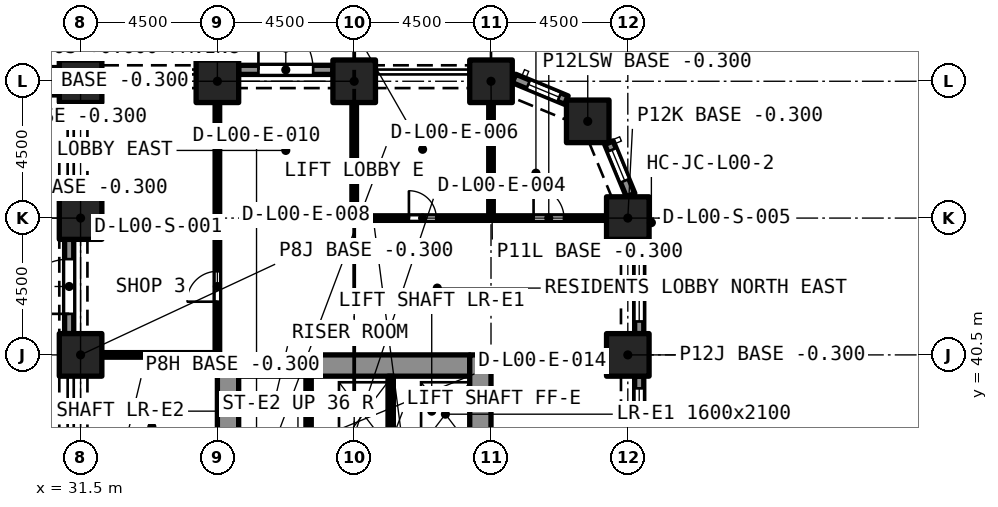
"""IFC4 building model, lengths in metres.
Left out: names, types, materials, properties, quantities, classifications, styles, units other than length and angle.
Written with IfcOpenShell. Run it as: python <this file> out.ifc"""

import sys

from ifc_helpers import new_model, si_unit, direction, frame, frame_2d, origin, origin_2d, place, context, subcontext, project, spatial, rectangle, extrude, element, fill, save


model = new_model("IFC4")
c1 = context("Model", 3, precision=1e-05, world=origin(), true_north=direction((0.0, 1.0)))
c2 = subcontext(c1, "Body", "Model", "MODEL_VIEW")
j1 = project(units=[si_unit("LENGTHUNIT", "METRE"), si_unit("PLANEANGLEUNIT", "RADIAN")], contexts=[c1])
p1 = place(None, origin())
s1 = spatial("IfcSite", under=j1, at=p1, CompositionType="ELEMENT")
p2 = place(p1, origin())
s2 = spatial("IfcBuilding", under=s1, at=p2, CompositionType="ELEMENT")
p3 = place(p2, origin())
s3 = spatial("IfcBuildingStorey", under=s2, at=p3, CompositionType="ELEMENT", Elevation=0.0)
for number, where, z_axis, x_axis in (
    (1, (31.5, 40.5, -0.3), (0.0, 0.0, 1.0), (1.0, 0.0, 0.0)),
    (2, (49.5, 40.5, -0.3), (0.0, 0.0, 1.0), (1.0, 0.0, 0.0)),
    (3, (31.5, 45.0, -0.3), (0.0, 0.0, 1.0), (1.0, 0.0, 0.0)),
    (4, (49.5, 45.0, -0.3), (0.0, 0.0, 1.0), (1.0, 0.0, 0.0)),
    (5, (48.182, 48.182, -0.3), (0.0, 0.0, 1.0), (1.0, 0.0, 0.0)),
    (6, (31.5, 49.5, -0.3), (0.0, 0.0, 1.0), (1.0, 0.0, 0.0)),
    (7, (36.0, 49.5, -0.3), (0.0, 0.0, 1.0), (1.0, 0.0, 0.0)),
    (8, (40.5, 49.5, -0.3), (0.0, 0.0, 1.0), (1.0, 0.0, 0.0)),
    (9, (45.0, 49.5, -0.3), (0.0, 0.0, 1.0), (1.0, 0.0, 0.0)),
):
    element("IfcColumn", number, at=place(p3, frame(where, z_axis=z_axis, x_axis=x_axis)), inside=s3, PredefinedType="COLUMN", context=c2, shape_type="SweptSolid", body=[
        extrude(rectangle(XDim=1.4, YDim=1.4, at=origin_2d()), origin(), (0.0, 0.0, 1.0), 6.3),
    ])
p4 = place(p3, frame((36.7, 40.15, -0.3), z_axis=(0.0, 0.0, 1.0), x_axis=(1.0, 0.0, 0.0)))
e10 = element("IfcWall", 10, at=p4, inside=s3, PredefinedType="SOLIDWALL", context=c2, shape_type="SweptSolid", body=[
    extrude(rectangle(XDim=7.6, YDim=0.7, at=frame_2d((3.8, 0.0))), origin(), (0.0, 0.0, 1.0), 6.3),
])
p5 = place(p3, frame((36.35, 27.0, -0.3), z_axis=(0.0, 0.0, 1.0), x_axis=(0.0, 1.0, 0.0)))
e11 = element("IfcWall", 11, at=p5, inside=s3, PredefinedType="SOLIDWALL", context=c2, shape_type="SweptSolid", body=[
    extrude(rectangle(XDim=13.5, YDim=0.7, at=frame_2d((6.75, 0.0))), origin(), (0.0, 0.0, 1.0), 6.3),
])
p6 = place(p5, frame((8.95, 0.0, 0.3)))
e12 = element("IfcOpeningElement", 12, at=p6, cuts=e11, PredefinedType="OPENING", context=c2, shape_type="SweptSolid", body=[
    extrude(rectangle(XDim=1.2, YDim=2.1, at=frame_2d((0.6, 1.05))), frame((0.0, 0.36, 0.0), z_axis=(0.0, -1.0, 0.0), x_axis=(1.0, 0.0, 0.0)), (0.0, 0.0, 1.0), 0.72),
])
p7 = place(p3, frame((44.65, 27.0, -0.3), z_axis=(0.0, 0.0, 1.0), x_axis=(0.0, 1.0, 0.0)))
e13 = element("IfcWall", 13, at=p7, inside=s3, PredefinedType="SOLIDWALL", context=c2, shape_type="SweptSolid", body=[
    extrude(rectangle(XDim=13.5, YDim=0.7, at=frame_2d((6.75, 0.0))), origin(), (0.0, 0.0, 1.0), 6.3),
])
p8 = place(p7, frame((8.95, 0.0, 0.3)))
e14 = element("IfcOpeningElement", 14, at=p8, cuts=e13, PredefinedType="OPENING", context=c2, shape_type="SweptSolid", body=[
    extrude(rectangle(XDim=1.2, YDim=2.1, at=frame_2d((0.6, 1.05))), frame((0.0, 0.36, 0.0), z_axis=(0.0, -1.0, 0.0), x_axis=(1.0, 0.0, 0.0)), (0.0, 0.0, 1.0), 0.72),
])
p9 = place(p3, frame((53.45, 44.4, -0.3), z_axis=(0.0, 0.0, 1.0), x_axis=(1.0, 0.0, 0.0)))
e15 = element("IfcColumn", 15, at=p9, inside=s3, PredefinedType="COLUMN", context=c2, shape_type="SweptSolid", body=[
    extrude(rectangle(XDim=0.6, YDim=0.6, at=origin_2d()), origin(), (0.0, 0.0, 1.0), 6.0),
])
p10 = place(p3, frame((49.875, 39.8, 0.0), z_axis=(0.0, 0.0, 1.0), x_axis=(0.0, -1.0, 0.0)))
e16 = element("IfcWall", 16, at=p10, inside=s3, PredefinedType="SOLIDWALL", context=c2, shape_type="SweptSolid", body=[
    extrude(rectangle(XDim=3.1, YDim=0.3, at=frame_2d((1.55, 0.0))), origin(), (0.0, 0.0, 1.0), 6.0),
])
p11 = place(p10, frame((0.4, 0.0, 0.45)))
e17 = element("IfcOpeningElement", 17, at=p11, cuts=e16, PredefinedType="OPENING", context=c2, shape_type="SweptSolid", body=[
    extrude(rectangle(XDim=2.3, YDim=3.3, at=frame_2d((1.15, 1.65))), frame((0.0, 0.16, 0.0), z_axis=(0.0, -1.0, 0.0), x_axis=(1.0, 0.0, 0.0)), (0.0, 0.0, 1.0), 0.32),
])
p12 = place(p3, frame((49.875, 44.3, 0.0), z_axis=(0.0, 0.0, 1.0), x_axis=(0.0, -1.0, 0.0)))
e18 = element("IfcWall", 18, at=p12, inside=s3, PredefinedType="SOLIDWALL", context=c2, shape_type="SweptSolid", body=[
    extrude(rectangle(XDim=3.1, YDim=0.3, at=frame_2d((1.55, 0.0))), origin(), (0.0, 0.0, 1.0), 6.0),
])
p13 = place(p12, frame((0.4, 0.0, 0.45)))
e19 = element("IfcOpeningElement", 19, at=p13, cuts=e18, PredefinedType="OPENING", context=c2, shape_type="SweptSolid", body=[
    extrude(rectangle(XDim=2.3, YDim=3.3, at=frame_2d((1.15, 1.65))), frame((0.0, 0.16, 0.0), z_axis=(0.0, -1.0, 0.0), x_axis=(1.0, 0.0, 0.0)), (0.0, 0.0, 1.0), 0.32),
])
p14 = place(p3, frame((48.878, 47.48, 0.0), z_axis=(0.0, 0.0, 1.0), x_axis=(0.38262540684, -0.923903565336, 0.0)))
e20 = element("IfcWall", 20, at=p14, inside=s3, PredefinedType="SOLIDWALL", context=c2, shape_type="SweptSolid", body=[
    extrude(rectangle(XDim=1.865, YDim=0.3, at=frame_2d((0.933, 0.0))), origin(), (0.0, 0.0, 1.0), 6.0),
])
p15 = place(p14, frame((0.258, 0.0, 0.45)))
e21 = element("IfcOpeningElement", 21, at=p15, cuts=e20, PredefinedType="OPENING", context=c2, shape_type="SweptSolid", body=[
    extrude(rectangle(XDim=1.1, YDim=3.3, at=frame_2d((0.55, 1.65))), frame((0.0, 0.16, 0.0), z_axis=(0.0, -1.0, 0.0), x_axis=(1.0, 0.0, 0.0)), (0.0, 0.0, 1.0), 0.32),
])
p16 = place(p3, frame((45.757, 49.592, 0.0), z_axis=(0.0, 0.0, 1.0), x_axis=(0.923857286003, -0.382737135771, 0.0)))
e22 = element("IfcWall", 22, at=p16, inside=s3, PredefinedType="SOLIDWALL", context=c2, shape_type="SweptSolid", body=[
    extrude(rectangle(XDim=1.865, YDim=0.3, at=frame_2d((0.933, 0.0))), origin(), (0.0, 0.0, 1.0), 6.0),
])
p17 = place(p16, frame((0.508, 0.0, 0.45)))
e23 = element("IfcOpeningElement", 23, at=p17, cuts=e22, PredefinedType="OPENING", context=c2, shape_type="SweptSolid", body=[
    extrude(rectangle(XDim=1.1, YDim=3.3, at=frame_2d((0.55, 1.65))), frame((0.0, 0.16, 0.0), z_axis=(0.0, -1.0, 0.0), x_axis=(1.0, 0.0, 0.0)), (0.0, 0.0, 1.0), 0.32),
])
p18 = place(p3, frame((36.7, 49.875, 0.0), z_axis=(0.0, 0.0, 1.0), x_axis=(1.0, 0.0, 0.0)))
e24 = element("IfcWall", 24, at=p18, inside=s3, PredefinedType="SOLIDWALL", context=c2, shape_type="SweptSolid", body=[
    extrude(rectangle(XDim=3.1, YDim=0.3, at=frame_2d((1.55, 0.0))), origin(), (0.0, 0.0, 1.0), 6.0),
])
p19 = place(p18, frame((0.65, 0.0, 0.0)))
e25 = element("IfcOpeningElement", 25, at=p19, cuts=e24, PredefinedType="OPENING", context=c2, shape_type="SweptSolid", body=[
    extrude(rectangle(XDim=1.8, YDim=2.4, at=frame_2d((0.9, 1.2))), frame((0.0, 0.16, 0.0), z_axis=(0.0, -1.0, 0.0), x_axis=(1.0, 0.0, 0.0)), (0.0, 0.0, 1.0), 0.32),
])
p20 = place(p3, frame((31.125, 41.2, 0.0), z_axis=(0.0, 0.0, 1.0), x_axis=(0.0, 1.0, 0.0)))
e26 = element("IfcWall", 26, at=p20, inside=s3, PredefinedType="SOLIDWALL", context=c2, shape_type="SweptSolid", body=[
    extrude(rectangle(XDim=3.1, YDim=0.3, at=frame_2d((1.55, 0.0))), origin(), (0.0, 0.0, 1.0), 6.0),
])
p21 = place(p20, frame((0.65, 0.0, 0.0)))
e27 = element("IfcOpeningElement", 27, at=p21, cuts=e26, PredefinedType="OPENING", context=c2, shape_type="SweptSolid", body=[
    extrude(rectangle(XDim=1.8, YDim=2.4, at=frame_2d((0.9, 1.2))), frame((0.0, 0.16, 0.0), z_axis=(0.0, -1.0, 0.0), x_axis=(1.0, 0.0, 0.0)), (0.0, 0.0, 1.0), 0.32),
])
p22 = place(p3, frame((28.55, 49.5, 0.0), z_axis=(0.0, 0.0, 1.0), x_axis=(1.0, 0.0, 0.0)))
e28 = element("IfcWall", 28, at=p22, inside=s3, PredefinedType="SOLIDWALL", context=c2, shape_type="SweptSolid", body=[
    extrude(rectangle(XDim=2.25, YDim=0.9, at=frame_2d((1.125, 0.0))), origin(), (0.0, 0.0, 1.0), 10.5),
])
p23 = place(p3, frame((50.35, 44.85, 0.0), z_axis=(0.0, 0.0, 1.0), x_axis=(1.0, 0.0, 0.0)))
e29 = element("IfcWall", 29, at=p23, inside=s3, PredefinedType="SOLIDWALL", context=c2, shape_type="SweptSolid", body=[
    extrude(rectangle(XDim=21.4, YDim=0.3, at=frame_2d((10.7, 0.0))), origin(), (0.0, 0.0, 1.0), 5.7),
])
p24 = place(p23, frame((15.6, 0.0, 0.0)))
e30 = element("IfcOpeningElement", 30, at=p24, cuts=e29, PredefinedType="OPENING", context=c2, shape_type="SweptSolid", body=[
    extrude(rectangle(XDim=2.0, YDim=2.4, at=frame_2d((1.0, 1.2))), frame((0.0, 0.16, 0.0), z_axis=(0.0, -1.0, 0.0), x_axis=(1.0, 0.0, 0.0)), (0.0, 0.0, 1.0), 0.32),
])
p25 = place(p3, frame((50.5, 9.3, 0.0), z_axis=(0.0, 0.0, 1.0), x_axis=(0.0, 1.0, 0.0)))
e31 = element("IfcWall", 31, at=p25, inside=s3, PredefinedType="SOLIDWALL", context=c2, shape_type="SweptSolid", body=[
    extrude(rectangle(XDim=35.4, YDim=0.3, at=frame_2d((17.7, 0.0))), origin(), (0.0, 0.0, 1.0), 5.7),
])
for number, where, z_axis, x_axis in (
    (32, (41.7, 37.5, 0.0), (0.0, 0.0, 1.0), (0.0, 1.0, 0.0)),
    (33, (39.0, 37.5, 0.0), (0.0, 0.0, 1.0), (0.0, 1.0, 0.0)),
):
    element("IfcWall", number, at=place(p3, frame(where, z_axis=z_axis, x_axis=x_axis)), inside=s3, PredefinedType="SOLIDWALL", context=c2, shape_type="SweptSolid", body=[
        extrude(rectangle(XDim=2.3, YDim=0.175, at=frame_2d((1.15, 0.0))), origin(), (0.0, 0.0, 1.0), 5.65),
    ])
p26 = place(p3, frame((32.2, 40.5, 0.0), z_axis=(0.0, 0.0, 1.0), x_axis=(1.0, 0.0, 0.0)))
e34 = element("IfcWall", 34, at=p26, inside=s3, PredefinedType="PARTITIONING", context=c2, shape_type="SweptSolid", body=[
    extrude(rectangle(XDim=3.725, YDim=0.15, at=frame_2d((1.863, 0.0))), origin(), (0.0, 0.0, 1.0), 5.65),
])
p27 = place(p3, frame((36.0, 45.0, 0.0), z_axis=(0.0, 0.0, 1.0), x_axis=(0.0, 1.0, 0.0)))
e35 = element("IfcWall", 35, at=p27, inside=s3, PredefinedType="PARTITIONING", context=c2, shape_type="SweptSolid", body=[
    extrude(rectangle(XDim=3.8, YDim=0.15, at=frame_2d((1.9, 0.0))), origin(), (0.0, 0.0, 1.0), 5.65),
])
p28 = place(p3, frame((36.0, 40.425, 0.0), z_axis=(0.0, 0.0, 1.0), x_axis=(0.0, 1.0, 0.0)))
e36 = element("IfcWall", 36, at=p28, inside=s3, PredefinedType="PARTITIONING", context=c2, shape_type="SweptSolid", body=[
    extrude(rectangle(XDim=4.575, YDim=0.15, at=frame_2d((2.288, 0.0))), origin(), (0.0, 0.0, 1.0), 5.65),
])
p29 = place(p28, frame((1.825, 0.0, 0.0)))
e37 = element("IfcOpeningElement", 37, at=p29, cuts=e36, PredefinedType="OPENING", context=c2, shape_type="SweptSolid", body=[
    extrude(rectangle(XDim=1.0, YDim=2.1, at=frame_2d((0.5, 1.05))), frame((0.0, 0.085, 0.0), z_axis=(0.0, -1.0, 0.0), x_axis=(1.0, 0.0, 0.0)), (0.0, 0.0, 1.0), 0.17),
])
p30 = place(p3, frame((45.0, 45.075, 0.0), z_axis=(0.0, 0.0, 1.0), x_axis=(0.0, 1.0, 0.0)))
e38 = element("IfcWall", 38, at=p30, inside=s3, PredefinedType="PARTITIONING", context=c2, shape_type="SweptSolid", body=[
    extrude(rectangle(XDim=3.725, YDim=0.15, at=frame_2d((1.863, 0.0))), origin(), (0.0, 0.0, 1.0), 5.65),
])
p31 = place(p3, frame((45.0, 45.0, 0.0), z_axis=(0.0, 0.0, 1.0), x_axis=(1.0, 0.0, 0.0)))
e39 = element("IfcWall", 39, at=p31, inside=s3, PredefinedType="PARTITIONING", context=c2, shape_type="SweptSolid", body=[
    extrude(rectangle(XDim=3.8, YDim=0.15, at=frame_2d((1.9, 0.0))), origin(), (0.0, 0.0, 1.0), 5.65),
])
p32 = place(p31, frame((1.4, 0.0, 0.0)))
e40 = element("IfcOpeningElement", 40, at=p32, cuts=e39, PredefinedType="OPENING", context=c2, shape_type="SweptSolid", body=[
    extrude(rectangle(XDim=1.0, YDim=2.1, at=frame_2d((0.5, 1.05))), frame((0.0, 0.085, 0.0), z_axis=(0.0, -1.0, 0.0), x_axis=(1.0, 0.0, 0.0)), (0.0, 0.0, 1.0), 0.17),
])
p33 = place(p3, frame((40.5, 45.075, 0.0), z_axis=(0.0, 0.0, 1.0), x_axis=(0.0, 1.0, 0.0)))
e41 = element("IfcWall", 41, at=p33, inside=s3, PredefinedType="PARTITIONING", context=c2, shape_type="SweptSolid", body=[
    extrude(rectangle(XDim=3.725, YDim=0.15, at=frame_2d((1.863, 0.0))), origin(), (0.0, 0.0, 1.0), 5.65),
])
p34 = place(p3, frame((40.425, 45.0, 0.0), z_axis=(0.0, 0.0, 1.0), x_axis=(1.0, 0.0, 0.0)))
e42 = element("IfcWall", 42, at=p34, inside=s3, PredefinedType="PARTITIONING", context=c2, shape_type="SweptSolid", body=[
    extrude(rectangle(XDim=4.575, YDim=0.15, at=frame_2d((2.288, 0.0))), origin(), (0.0, 0.0, 1.0), 5.65),
])
p35 = place(p34, frame((1.875, 0.0, 0.0)))
e43 = element("IfcOpeningElement", 43, at=p35, cuts=e42, PredefinedType="OPENING", context=c2, shape_type="SweptSolid", body=[
    extrude(rectangle(XDim=0.9, YDim=2.1, at=frame_2d((0.45, 1.05))), frame((0.0, 0.085, 0.0), z_axis=(0.0, -1.0, 0.0), x_axis=(1.0, 0.0, 0.0)), (0.0, 0.0, 1.0), 0.17),
])
p36 = place(p3, frame((50.65, 39.0, 0.0), z_axis=(0.0, 0.0, 1.0), x_axis=(1.0, 0.0, 0.0)))
e44 = element("IfcWall", 44, at=p36, inside=s3, PredefinedType="PARTITIONING", context=c2, shape_type="SweptSolid", body=[
    extrude(rectangle(XDim=0.75, YDim=0.2, at=frame_2d((0.375, 0.0))), origin(), (0.0, 0.0, 1.0), 4.9),
])
p37 = place(p3, frame((51.4, 39.0, 0.0), z_axis=(0.0, 0.0, 1.0), x_axis=(1.0, 0.0, 0.0)))
e45 = element("IfcWall", 45, at=p37, inside=s3, PredefinedType="PARTITIONING", context=c2, shape_type="SweptSolid", body=[
    extrude(rectangle(XDim=1.7, YDim=0.2, at=frame_2d((0.85, 0.0))), origin(), (0.0, 0.0, 1.0), 4.9),
])
p38 = place(p37, frame((0.35, 0.0, 0.0)))
e46 = element("IfcOpeningElement", 46, at=p38, cuts=e45, PredefinedType="OPENING", context=c2, shape_type="SweptSolid", body=[
    extrude(rectangle(XDim=1.0, YDim=2.1, at=frame_2d((0.5, 1.05))), frame((0.0, 0.11, 0.0), z_axis=(0.0, -1.0, 0.0), x_axis=(1.0, 0.0, 0.0)), (0.0, 0.0, 1.0), 0.22),
])
p39 = place(p3, frame((53.1, 39.0, 0.0), z_axis=(0.0, 0.0, 1.0), x_axis=(1.0, 0.0, 0.0)))
e47 = element("IfcWall", 47, at=p39, inside=s3, PredefinedType="PARTITIONING", context=c2, shape_type="SweptSolid", body=[
    extrude(rectangle(XDim=0.75, YDim=0.2, at=frame_2d((0.375, 0.0))), origin(), (0.0, 0.0, 1.0), 4.9),
])
p40 = place(p3, frame((53.85, 39.0, 0.0), z_axis=(0.0, 0.0, 1.0), x_axis=(1.0, 0.0, 0.0)))
e48 = element("IfcWall", 48, at=p40, inside=s3, PredefinedType="PARTITIONING", context=c2, shape_type="SweptSolid", body=[
    extrude(rectangle(XDim=1.3, YDim=0.2, at=frame_2d((0.65, 0.0))), origin(), (0.0, 0.0, 1.0), 5.7),
])
p41 = place(p3, frame((55.15, 39.0, 0.0), z_axis=(0.0, 0.0, 1.0), x_axis=(1.0, 0.0, 0.0)))
e49 = element("IfcWall", 49, at=p41, inside=s3, PredefinedType="PARTITIONING", context=c2, shape_type="SweptSolid", body=[
    extrude(rectangle(XDim=1.7, YDim=0.2, at=frame_2d((0.85, 0.0))), origin(), (0.0, 0.0, 1.0), 5.7),
])
p42 = place(p41, frame((0.35, 0.0, 0.0)))
e50 = element("IfcOpeningElement", 50, at=p42, cuts=e49, PredefinedType="OPENING", context=c2, shape_type="SweptSolid", body=[
    extrude(rectangle(XDim=1.0, YDim=2.1, at=frame_2d((0.5, 1.05))), frame((0.0, 0.11, 0.0), z_axis=(0.0, -1.0, 0.0), x_axis=(1.0, 0.0, 0.0)), (0.0, 0.0, 1.0), 0.22),
])
p43 = place(p3, frame((56.85, 39.0, 0.0), z_axis=(0.0, 0.0, 1.0), x_axis=(1.0, 0.0, 0.0)))
e51 = element("IfcWall", 51, at=p43, inside=s3, PredefinedType="PARTITIONING", context=c2, shape_type="SweptSolid", body=[
    extrude(rectangle(XDim=1.3, YDim=0.2, at=frame_2d((0.65, 0.0))), origin(), (0.0, 0.0, 1.0), 5.7),
])
p44 = place(p3, frame((58.15, 39.0, 0.0), z_axis=(0.0, 0.0, 1.0), x_axis=(1.0, 0.0, 0.0)))
e52 = element("IfcWall", 52, at=p44, inside=s3, PredefinedType="PARTITIONING", context=c2, shape_type="SweptSolid", body=[
    extrude(rectangle(XDim=1.3, YDim=0.2, at=frame_2d((0.65, 0.0))), origin(), (0.0, 0.0, 1.0), 4.9),
])
for number, where, z_axis, x_axis in (
    (53, (53.85, 39.1, 0.0), (0.0, 0.0, 1.0), (0.0, 1.0, 0.0)),
    (54, (58.15, 39.1, 0.0), (0.0, 0.0, 1.0), (0.0, 1.0, 0.0)),
):
    element("IfcWall", number, at=place(p3, frame(where, z_axis=z_axis, x_axis=x_axis)), inside=s3, PredefinedType="PARTITIONING", context=c2, shape_type="SweptSolid", body=[
        extrude(rectangle(XDim=5.6, YDim=0.2, at=frame_2d((2.8, 0.0))), origin(), (0.0, 0.0, 1.0), 4.9),
    ])
p45 = place(p11, origin())
e55 = element("IfcWindow", 55, at=p45, inside=s3, PartitioningType="SINGLE_PANEL", PredefinedType="WINDOW", context=c2, shape_type="SweptSolid", body=[
    extrude(rectangle(XDim=2.3, YDim=3.3, at=frame_2d((1.15, 1.65))), frame((0.0, 0.03, 0.0), z_axis=(0.0, -1.0, 0.0), x_axis=(1.0, 0.0, 0.0)), (0.0, 0.0, 1.0), 0.06),
])
fill(e17, e55)
p46 = place(p13, origin())
e56 = element("IfcWindow", 56, at=p46, inside=s3, PartitioningType="SINGLE_PANEL", PredefinedType="WINDOW", context=c2, shape_type="SweptSolid", body=[
    extrude(rectangle(XDim=2.3, YDim=3.3, at=frame_2d((1.15, 1.65))), frame((0.0, 0.03, 0.0), z_axis=(0.0, -1.0, 0.0), x_axis=(1.0, 0.0, 0.0)), (0.0, 0.0, 1.0), 0.06),
])
fill(e19, e56)
p47 = place(p15, origin())
e57 = element("IfcWindow", 57, at=p47, inside=s3, PartitioningType="SINGLE_PANEL", PredefinedType="WINDOW", context=c2, shape_type="SweptSolid", body=[
    extrude(rectangle(XDim=1.1, YDim=3.3, at=frame_2d((0.55, 1.65))), frame((0.0, 0.03, 0.0), z_axis=(0.0, -1.0, 0.0), x_axis=(1.0, 0.0, 0.0)), (0.0, 0.0, 1.0), 0.06),
])
fill(e21, e57)
p48 = place(p17, origin())
e58 = element("IfcWindow", 58, at=p48, inside=s3, PartitioningType="SINGLE_PANEL", PredefinedType="WINDOW", context=c2, shape_type="SweptSolid", body=[
    extrude(rectangle(XDim=1.1, YDim=3.3, at=frame_2d((0.55, 1.65))), frame((0.0, 0.03, 0.0), z_axis=(0.0, -1.0, 0.0), x_axis=(1.0, 0.0, 0.0)), (0.0, 0.0, 1.0), 0.06),
])
fill(e23, e58)
p49 = place(p19, origin())
e59 = element("IfcDoor", 59, at=p49, inside=s3, OperationType="SINGLE_SWING_LEFT", PredefinedType="DOOR", context=c2, shape_type="SweptSolid", body=[
    extrude(rectangle(XDim=1.8, YDim=2.4, at=frame_2d((0.9, 1.2))), frame((0.0, 0.025, 0.0), z_axis=(0.0, -1.0, 0.0), x_axis=(1.0, 0.0, 0.0)), (0.0, 0.0, 1.0), 0.05),
])
fill(e25, e59)
p50 = place(p21, origin())
e60 = element("IfcDoor", 60, at=p50, inside=s3, OperationType="SINGLE_SWING_LEFT", PredefinedType="DOOR", context=c2, shape_type="SweptSolid", body=[
    extrude(rectangle(XDim=1.8, YDim=2.4, at=frame_2d((0.9, 1.2))), frame((0.0, 0.025, 0.0), z_axis=(0.0, -1.0, 0.0), x_axis=(1.0, 0.0, 0.0)), (0.0, 0.0, 1.0), 0.05),
])
fill(e27, e60)
p51 = place(p29, origin())
e61 = element("IfcDoor", 61, at=p51, inside=s3, OperationType="SINGLE_SWING_RIGHT", PredefinedType="DOOR", context=c2, shape_type="SweptSolid", body=[
    extrude(rectangle(XDim=1.0, YDim=2.1, at=frame_2d((0.5, 1.05))), frame((0.0, 0.025, 0.0), z_axis=(0.0, -1.0, 0.0), x_axis=(1.0, 0.0, 0.0)), (0.0, 0.0, 1.0), 0.05),
])
fill(e37, e61)
p52 = place(p32, origin())
e62 = element("IfcDoor", 62, at=p52, inside=s3, OperationType="SINGLE_SWING_RIGHT", PredefinedType="DOOR", context=c2, shape_type="SweptSolid", body=[
    extrude(rectangle(XDim=1.0, YDim=2.1, at=frame_2d((0.5, 1.05))), frame((0.0, 0.025, 0.0), z_axis=(0.0, -1.0, 0.0), x_axis=(1.0, 0.0, 0.0)), (0.0, 0.0, 1.0), 0.05),
])
fill(e40, e62)
p53 = place(p35, origin())
e63 = element("IfcDoor", 63, at=p53, inside=s3, OperationType="SINGLE_SWING_RIGHT", PredefinedType="DOOR", context=c2, shape_type="SweptSolid", body=[
    extrude(rectangle(XDim=0.9, YDim=2.1, at=frame_2d((0.45, 1.05))), frame((0.0, 0.025, 0.0), z_axis=(0.0, -1.0, 0.0), x_axis=(1.0, 0.0, 0.0)), (0.0, 0.0, 1.0), 0.05),
])
fill(e43, e63)
p54 = place(p38, origin())
e64 = element("IfcDoor", 64, at=p54, inside=s3, OperationType="SINGLE_SWING_LEFT", PredefinedType="DOOR", context=c2, shape_type="SweptSolid", body=[
    extrude(rectangle(XDim=1.0, YDim=2.1, at=frame_2d((0.5, 1.05))), frame((0.0, 0.025, 0.0), z_axis=(0.0, -1.0, 0.0), x_axis=(1.0, 0.0, 0.0)), (0.0, 0.0, 1.0), 0.05),
])
fill(e46, e64)
p55 = place(p42, origin())
e65 = element("IfcDoor", 65, at=p55, inside=s3, OperationType="SINGLE_SWING_RIGHT", PredefinedType="DOOR", context=c2, shape_type="SweptSolid", body=[
    extrude(rectangle(XDim=1.0, YDim=2.1, at=frame_2d((0.5, 1.05))), frame((0.0, 0.025, 0.0), z_axis=(0.0, -1.0, 0.0), x_axis=(1.0, 0.0, 0.0)), (0.0, 0.0, 1.0), 0.05),
])
fill(e50, e65)
save(model, sys.argv[1])
